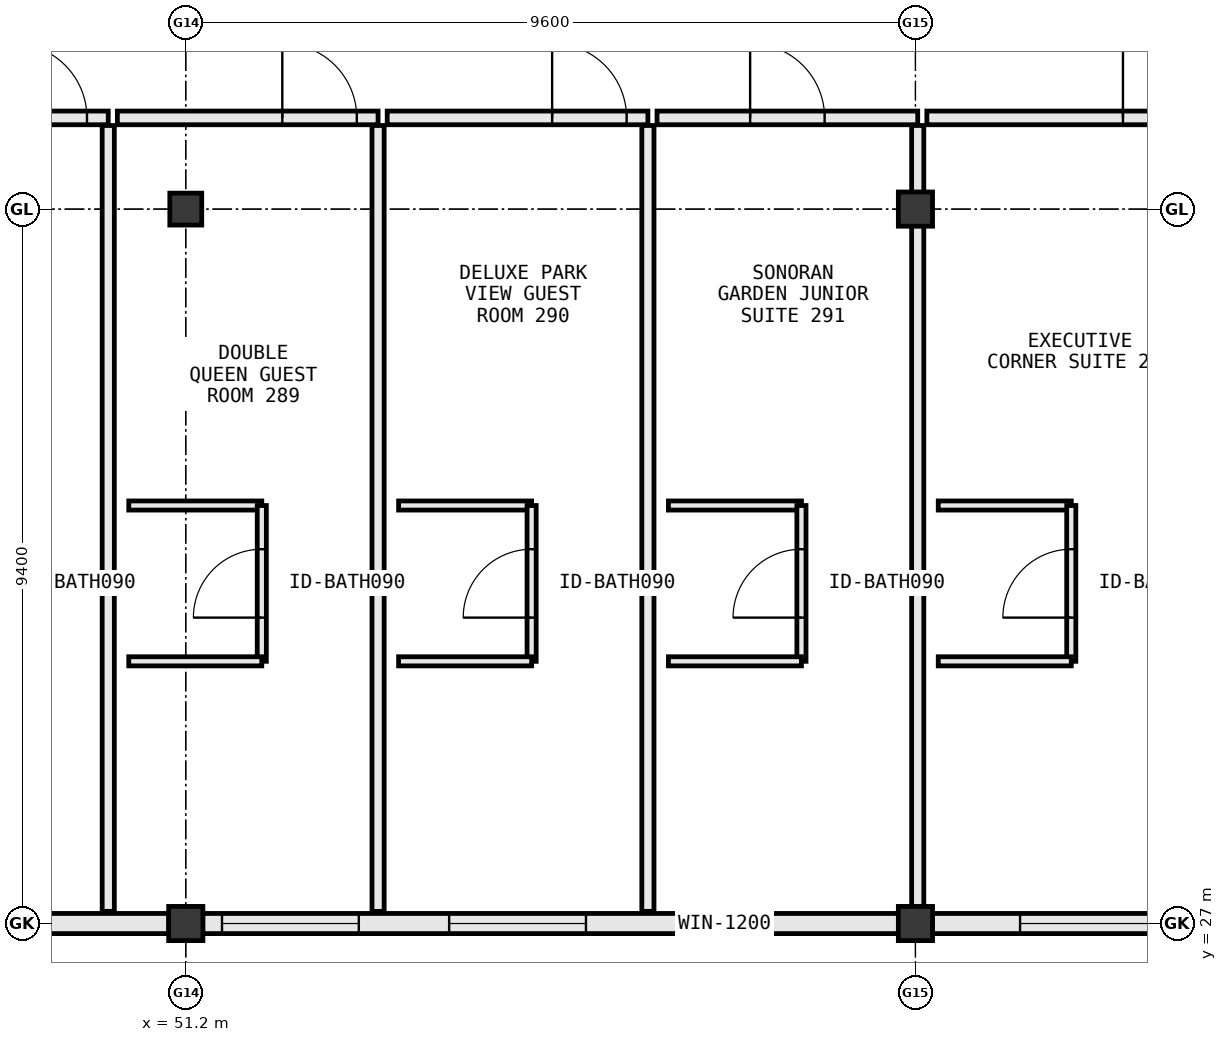
"""IFC4 building model, lengths in metres.
Left out: names, types, materials, properties, quantities, classifications, styles, units other than length and angle.
Written with IfcOpenShell. Run it as: python <this file> out.ifc"""

import sys

from ifc_helpers import new_model, si_unit, direction, frame, frame_2d, origin, origin_2d, place, context, subcontext, project, spatial, rectangle, extrude, element, fill, save


model = new_model("IFC4")
c1 = context("Model", 3, precision=1e-05, world=origin(), true_north=direction((0.0, 1.0)))
c2 = subcontext(c1, "Body", "Model", "MODEL_VIEW")
j1 = project(units=[si_unit("LENGTHUNIT", "METRE"), si_unit("PLANEANGLEUNIT", "RADIAN")], contexts=[c1])
p1 = place(None, origin())
s1 = spatial("IfcSite", under=j1, at=p1, CompositionType="ELEMENT")
p2 = place(p1, origin())
s2 = spatial("IfcBuilding", under=s1, at=p2, CompositionType="ELEMENT")
p3 = place(p2, frame((0.0, 0.0, 42.8)))
s3 = spatial("IfcBuildingStorey", under=s2, at=p3, CompositionType="ELEMENT", Elevation=42.8)
for number, where, z_axis, x_axis in (
    (1, (60.8, 27.0, 0.0), (0.0, 0.0, 1.0), (1.0, 0.0, 0.0)),
    (2, (60.8, 36.4, 0.0), (0.0, 0.0, 1.0), (1.0, 0.0, 0.0)),
    (3, (51.2, 27.0, 0.0), (0.0, 0.0, 1.0), (1.0, 0.0, 0.0)),
):
    element("IfcColumn", number, at=place(p3, frame(where, z_axis=z_axis, x_axis=x_axis)), inside=s3, PredefinedType="COLUMN", context=c2, shape_type="SweptSolid", body=[
        extrude(rectangle(XDim=0.45, YDim=0.45, at=origin_2d()), origin(), (0.0, 0.0, 1.0), 3.8),
    ])
p4 = place(p3, frame((51.2, 36.4, 0.0), z_axis=(0.0, 0.0, 1.0), x_axis=(1.0, 0.0, 0.0)))
e4 = element("IfcColumn", 4, at=p4, inside=s3, PredefinedType="COLUMN", context=c2, shape_type="SweptSolid", body=[
    extrude(rectangle(XDim=0.42, YDim=0.42, at=origin_2d()), origin(), (0.0, 0.0, 1.0), 3.8),
])
p5 = place(p3, frame((46.623, 27.0, 0.0), z_axis=(0.0, 0.0, 1.0), x_axis=(1.0, 0.0, 0.0)))
e5 = element("IfcWall", 5, at=p5, inside=s3, PredefinedType="STANDARD", context=c2, shape_type="SweptSolid", body=[
    extrude(rectangle(XDim=4.354, YDim=0.265, at=frame_2d((2.177, 0.0))), origin(), (0.0, 0.0, 1.0), 2.995),
])
p6 = place(p5, frame((0.942, 0.0, 0.85)))
e6 = element("IfcOpeningElement", 6, at=p6, cuts=e5, PredefinedType="OPENING", context=c2, shape_type="SweptSolid", body=[
    extrude(rectangle(XDim=1.8, YDim=1.85, at=frame_2d((0.9, 0.925))), frame((0.0, 0.145, 0.0), z_axis=(0.0, -1.0, 0.0), x_axis=(1.0, 0.0, 0.0)), (0.0, 0.0, 1.0), 0.289),
])
p7 = place(p3, frame((51.423, 27.0, 0.0), z_axis=(0.0, 0.0, 1.0), x_axis=(1.0, 0.0, 0.0)))
e7 = element("IfcWall", 7, at=p7, inside=s3, PredefinedType="STANDARD", context=c2, shape_type="SweptSolid", body=[
    extrude(rectangle(XDim=9.154, YDim=0.265, at=frame_2d((4.577, 0.0))), origin(), (0.0, 0.0, 1.0), 2.815),
])
p8 = place(p7, frame((6.265, 0.0, 0.85)))
e8 = element("IfcOpeningElement", 8, at=p8, cuts=e7, PredefinedType="OPENING", context=c2, shape_type="SweptSolid", body=[
    extrude(rectangle(XDim=1.2, YDim=1.55, at=frame_2d((0.6, 0.775))), frame((0.0, 0.145, 0.0), z_axis=(0.0, -1.0, 0.0), x_axis=(1.0, 0.0, 0.0)), (0.0, 0.0, 1.0), 0.289),
])
p9 = place(p7, frame((0.253, 0.0, 0.825)))
e9 = element("IfcOpeningElement", 9, at=p9, cuts=e7, PredefinedType="OPENING", context=c2, shape_type="SweptSolid", body=[
    extrude(rectangle(XDim=1.8, YDim=1.85, at=frame_2d((0.9, 0.925))), frame((0.0, 0.145, 0.0), z_axis=(0.0, -1.0, 0.0), x_axis=(1.0, 0.0, 0.0)), (0.0, 0.0, 1.0), 0.289),
])
p10 = place(p7, frame((3.242, 0.0, 0.825)))
e10 = element("IfcOpeningElement", 10, at=p10, cuts=e7, PredefinedType="OPENING", context=c2, shape_type="SweptSolid", body=[
    extrude(rectangle(XDim=1.8, YDim=1.85, at=frame_2d((0.9, 0.925))), frame((0.0, 0.145, 0.0), z_axis=(0.0, -1.0, 0.0), x_axis=(1.0, 0.0, 0.0)), (0.0, 0.0, 1.0), 0.289),
])
p11 = place(p3, frame((61.023, 27.0, 0.0), z_axis=(0.0, 0.0, 1.0), x_axis=(1.0, 0.0, 0.0)))
e11 = element("IfcWall", 11, at=p11, inside=s3, PredefinedType="STANDARD", context=c2, shape_type="SweptSolid", body=[
    extrude(rectangle(XDim=4.369, YDim=0.265, at=frame_2d((2.185, 0.0))), origin(), (0.0, 0.0, 1.0), 2.995),
])
p12 = place(p11, frame((1.154, 0.0, 0.85)))
e12 = element("IfcOpeningElement", 12, at=p12, cuts=e11, PredefinedType="OPENING", context=c2, shape_type="SweptSolid", body=[
    extrude(rectangle(XDim=1.8, YDim=1.85, at=frame_2d((0.9, 0.925))), frame((0.0, 0.145, 0.0), z_axis=(0.0, -1.0, 0.0), x_axis=(1.0, 0.0, 0.0)), (0.0, 0.0, 1.0), 0.289),
])
p13 = place(p3, frame((50.18, 37.6, 0.0), z_axis=(0.0, 0.0, 1.0), x_axis=(-1.0, 0.0, 0.0)))
e13 = element("IfcWall", 13, at=p13, inside=s3, PredefinedType="PARTITIONING", context=c2, shape_type="SweptSolid", body=[
    extrude(rectangle(XDim=3.43, YDim=0.18, at=frame_2d((1.715, 0.0))), origin(), (0.0, 0.0, 1.0), 3.54),
])
p14 = place(p13, frame((0.28, 0.0, 0.0)))
e14 = element("IfcOpeningElement", 14, at=p14, cuts=e13, PredefinedType="OPENING", context=c2, shape_type="SweptSolid", body=[
    extrude(rectangle(XDim=0.98, YDim=2.18, at=frame_2d((0.49, 1.09))), frame((0.0, 0.102, 0.0), z_axis=(0.0, -1.0, 0.0), x_axis=(1.0, 0.0, 0.0)), (0.0, 0.0, 1.0), 0.204),
])
p15 = place(p3, frame((50.18, 27.16, 0.0), z_axis=(0.0, 0.0, 1.0), x_axis=(0.0, 1.0, 0.0)))
e15 = element("IfcWall", 15, at=p15, inside=s3, PredefinedType="PARTITIONING", context=c2, shape_type="SweptSolid", body=[
    extrude(rectangle(XDim=10.34, YDim=0.16, at=frame_2d((5.17, 0.0))), origin(), (0.0, 0.0, 1.0), 3.54),
])
p16 = place(p3, frame((53.73, 37.6, 0.0), z_axis=(0.0, 0.0, 1.0), x_axis=(-1.0, 0.0, 0.0)))
e16 = element("IfcWall", 16, at=p16, inside=s3, PredefinedType="PARTITIONING", context=c2, shape_type="SweptSolid", body=[
    extrude(rectangle(XDim=3.43, YDim=0.18, at=frame_2d((1.715, 0.0))), origin(), (0.0, 0.0, 1.0), 3.54),
])
p17 = place(p16, frame((0.28, 0.0, 0.0)))
e17 = element("IfcOpeningElement", 17, at=p17, cuts=e16, PredefinedType="OPENING", context=c2, shape_type="SweptSolid", body=[
    extrude(rectangle(XDim=0.98, YDim=2.18, at=frame_2d((0.49, 1.09))), frame((0.0, 0.102, 0.0), z_axis=(0.0, -1.0, 0.0), x_axis=(1.0, 0.0, 0.0)), (0.0, 0.0, 1.0), 0.204),
])
p18 = place(p3, frame((53.73, 27.16, 0.0), z_axis=(0.0, 0.0, 1.0), x_axis=(0.0, 1.0, 0.0)))
e18 = element("IfcWall", 18, at=p18, inside=s3, PredefinedType="PARTITIONING", context=c2, shape_type="SweptSolid", body=[
    extrude(rectangle(XDim=10.34, YDim=0.16, at=frame_2d((5.17, 0.0))), origin(), (0.0, 0.0, 1.0), 3.54),
])
p19 = place(p3, frame((50.45, 32.5, 0.0), z_axis=(0.0, 0.0, 1.0), x_axis=(1.0, 0.0, 0.0)))
e19 = element("IfcWall", 19, at=p19, inside=s3, PredefinedType="PARTITIONING", context=c2, shape_type="SweptSolid", body=[
    extrude(rectangle(XDim=1.75, YDim=0.12, at=frame_2d((0.875, 0.0))), origin(), (0.0, 0.0, 1.0), 3.54),
])
p20 = place(p3, frame((52.2, 30.45, 0.0), z_axis=(0.0, 0.0, 1.0), x_axis=(0.0, 1.0, 0.0)))
e20 = element("IfcWall", 20, at=p20, inside=s3, PredefinedType="PARTITIONING", context=c2, shape_type="SweptSolid", body=[
    extrude(rectangle(XDim=2.05, YDim=0.12, at=frame_2d((1.025, 0.0))), origin(), (0.0, 0.0, 1.0), 3.54),
])
p21 = place(p20, frame((0.575, 0.0, 0.0)))
e21 = element("IfcOpeningElement", 21, at=p21, cuts=e20, PredefinedType="OPENING", context=c2, shape_type="SweptSolid", body=[
    extrude(rectangle(XDim=0.9, YDim=2.15, at=frame_2d((0.45, 1.075))), frame((0.0, 0.072, 0.0), z_axis=(0.0, -1.0, 0.0), x_axis=(1.0, 0.0, 0.0)), (0.0, 0.0, 1.0), 0.144),
])
p22 = place(p3, frame((50.45, 30.45, 0.0), z_axis=(0.0, 0.0, 1.0), x_axis=(1.0, 0.0, 0.0)))
e22 = element("IfcWall", 22, at=p22, inside=s3, PredefinedType="PARTITIONING", context=c2, shape_type="SweptSolid", body=[
    extrude(rectangle(XDim=1.75, YDim=0.12, at=frame_2d((0.875, 0.0))), origin(), (0.0, 0.0, 1.0), 3.54),
])
p23 = place(p3, frame((57.28, 37.6, 0.0), z_axis=(0.0, 0.0, 1.0), x_axis=(-1.0, 0.0, 0.0)))
e23 = element("IfcWall", 23, at=p23, inside=s3, PredefinedType="PARTITIONING", context=c2, shape_type="SweptSolid", body=[
    extrude(rectangle(XDim=3.43, YDim=0.18, at=frame_2d((1.715, 0.0))), origin(), (0.0, 0.0, 1.0), 3.54),
])
p24 = place(p23, frame((0.28, 0.0, 0.0)))
e24 = element("IfcOpeningElement", 24, at=p24, cuts=e23, PredefinedType="OPENING", context=c2, shape_type="SweptSolid", body=[
    extrude(rectangle(XDim=0.98, YDim=2.18, at=frame_2d((0.49, 1.09))), frame((0.0, 0.102, 0.0), z_axis=(0.0, -1.0, 0.0), x_axis=(1.0, 0.0, 0.0)), (0.0, 0.0, 1.0), 0.204),
])
p25 = place(p3, frame((57.28, 27.16, 0.0), z_axis=(0.0, 0.0, 1.0), x_axis=(0.0, 1.0, 0.0)))
e25 = element("IfcWall", 25, at=p25, inside=s3, PredefinedType="PARTITIONING", context=c2, shape_type="SweptSolid", body=[
    extrude(rectangle(XDim=10.34, YDim=0.16, at=frame_2d((5.17, 0.0))), origin(), (0.0, 0.0, 1.0), 3.085),
])
p26 = place(p3, frame((54.0, 32.5, 0.0), z_axis=(0.0, 0.0, 1.0), x_axis=(1.0, 0.0, 0.0)))
e26 = element("IfcWall", 26, at=p26, inside=s3, PredefinedType="PARTITIONING", context=c2, shape_type="SweptSolid", body=[
    extrude(rectangle(XDim=1.75, YDim=0.12, at=frame_2d((0.875, 0.0))), origin(), (0.0, 0.0, 1.0), 3.54),
])
p27 = place(p3, frame((55.75, 30.45, 0.0), z_axis=(0.0, 0.0, 1.0), x_axis=(0.0, 1.0, 0.0)))
e27 = element("IfcWall", 27, at=p27, inside=s3, PredefinedType="PARTITIONING", context=c2, shape_type="SweptSolid", body=[
    extrude(rectangle(XDim=2.05, YDim=0.12, at=frame_2d((1.025, 0.0))), origin(), (0.0, 0.0, 1.0), 3.54),
])
p28 = place(p27, frame((0.575, 0.0, 0.0)))
e28 = element("IfcOpeningElement", 28, at=p28, cuts=e27, PredefinedType="OPENING", context=c2, shape_type="SweptSolid", body=[
    extrude(rectangle(XDim=0.9, YDim=2.15, at=frame_2d((0.45, 1.075))), frame((0.0, 0.072, 0.0), z_axis=(0.0, -1.0, 0.0), x_axis=(1.0, 0.0, 0.0)), (0.0, 0.0, 1.0), 0.144),
])
p29 = place(p3, frame((54.0, 30.45, 0.0), z_axis=(0.0, 0.0, 1.0), x_axis=(1.0, 0.0, 0.0)))
e29 = element("IfcWall", 29, at=p29, inside=s3, PredefinedType="PARTITIONING", context=c2, shape_type="SweptSolid", body=[
    extrude(rectangle(XDim=1.75, YDim=0.12, at=frame_2d((0.875, 0.0))), origin(), (0.0, 0.0, 1.0), 3.54),
])
p30 = place(p3, frame((60.83, 37.6, 0.0), z_axis=(0.0, 0.0, 1.0), x_axis=(-1.0, 0.0, 0.0)))
e30 = element("IfcWall", 30, at=p30, inside=s3, PredefinedType="PARTITIONING", context=c2, shape_type="SweptSolid", body=[
    extrude(rectangle(XDim=3.43, YDim=0.18, at=frame_2d((1.715, 0.0))), origin(), (0.0, 0.0, 1.0), 3.54),
])
p31 = place(p30, frame((1.225, 0.0, 0.0)))
e31 = element("IfcOpeningElement", 31, at=p31, cuts=e30, PredefinedType="OPENING", context=c2, shape_type="SweptSolid", body=[
    extrude(rectangle(XDim=0.98, YDim=2.18, at=frame_2d((0.49, 1.09))), frame((0.0, 0.102, 0.0), z_axis=(0.0, -1.0, 0.0), x_axis=(1.0, 0.0, 0.0)), (0.0, 0.0, 1.0), 0.204),
])
p32 = place(p3, frame((60.83, 27.16, 0.0), z_axis=(0.0, 0.0, 1.0), x_axis=(0.0, 1.0, 0.0)))
e32 = element("IfcWall", 32, at=p32, inside=s3, PredefinedType="PARTITIONING", context=c2, shape_type="SweptSolid", body=[
    extrude(rectangle(XDim=10.34, YDim=0.16, at=frame_2d((5.17, 0.0))), origin(), (0.0, 0.0, 1.0), 2.895),
])
p33 = place(p3, frame((57.55, 32.5, 0.0), z_axis=(0.0, 0.0, 1.0), x_axis=(1.0, 0.0, 0.0)))
e33 = element("IfcWall", 33, at=p33, inside=s3, PredefinedType="PARTITIONING", context=c2, shape_type="SweptSolid", body=[
    extrude(rectangle(XDim=1.75, YDim=0.12, at=frame_2d((0.875, 0.0))), origin(), (0.0, 0.0, 1.0), 3.54),
])
p34 = place(p3, frame((59.3, 30.45, 0.0), z_axis=(0.0, 0.0, 1.0), x_axis=(0.0, 1.0, 0.0)))
e34 = element("IfcWall", 34, at=p34, inside=s3, PredefinedType="PARTITIONING", context=c2, shape_type="SweptSolid", body=[
    extrude(rectangle(XDim=2.05, YDim=0.12, at=frame_2d((1.025, 0.0))), origin(), (0.0, 0.0, 1.0), 3.54),
])
p35 = place(p34, frame((0.575, 0.0, 0.0)))
e35 = element("IfcOpeningElement", 35, at=p35, cuts=e34, PredefinedType="OPENING", context=c2, shape_type="SweptSolid", body=[
    extrude(rectangle(XDim=0.9, YDim=2.15, at=frame_2d((0.45, 1.075))), frame((0.0, 0.072, 0.0), z_axis=(0.0, -1.0, 0.0), x_axis=(1.0, 0.0, 0.0)), (0.0, 0.0, 1.0), 0.144),
])
p36 = place(p3, frame((57.55, 30.45, 0.0), z_axis=(0.0, 0.0, 1.0), x_axis=(1.0, 0.0, 0.0)))
e36 = element("IfcWall", 36, at=p36, inside=s3, PredefinedType="PARTITIONING", context=c2, shape_type="SweptSolid", body=[
    extrude(rectangle(XDim=1.75, YDim=0.12, at=frame_2d((0.875, 0.0))), origin(), (0.0, 0.0, 1.0), 3.54),
])
p37 = place(p3, frame((65.13, 37.6, 0.0), z_axis=(0.0, 0.0, 1.0), x_axis=(-1.0, 0.0, 0.0)))
e37 = element("IfcWall", 37, at=p37, inside=s3, PredefinedType="PARTITIONING", context=c2, shape_type="SweptSolid", body=[
    extrude(rectangle(XDim=4.18, YDim=0.18, at=frame_2d((2.09, 0.0))), origin(), (0.0, 0.0, 1.0), 3.54),
])
p38 = place(p37, frame((0.62, 0.0, 0.0)))
e38 = element("IfcOpeningElement", 38, at=p38, cuts=e37, PredefinedType="OPENING", context=c2, shape_type="SweptSolid", body=[
    extrude(rectangle(XDim=0.98, YDim=2.18, at=frame_2d((0.49, 1.09))), frame((0.0, 0.102, 0.0), z_axis=(0.0, -1.0, 0.0), x_axis=(1.0, 0.0, 0.0)), (0.0, 0.0, 1.0), 0.204),
])
p39 = place(p3, frame((61.1, 32.5, 0.0), z_axis=(0.0, 0.0, 1.0), x_axis=(1.0, 0.0, 0.0)))
e39 = element("IfcWall", 39, at=p39, inside=s3, PredefinedType="PARTITIONING", context=c2, shape_type="SweptSolid", body=[
    extrude(rectangle(XDim=1.75, YDim=0.12, at=frame_2d((0.875, 0.0))), origin(), (0.0, 0.0, 1.0), 3.54),
])
p40 = place(p3, frame((62.85, 30.45, 0.0), z_axis=(0.0, 0.0, 1.0), x_axis=(0.0, 1.0, 0.0)))
e40 = element("IfcWall", 40, at=p40, inside=s3, PredefinedType="PARTITIONING", context=c2, shape_type="SweptSolid", body=[
    extrude(rectangle(XDim=2.05, YDim=0.12, at=frame_2d((1.025, 0.0))), origin(), (0.0, 0.0, 1.0), 3.085),
])
p41 = place(p40, frame((0.575, 0.0, 0.0)))
e41 = element("IfcOpeningElement", 41, at=p41, cuts=e40, PredefinedType="OPENING", context=c2, shape_type="SweptSolid", body=[
    extrude(rectangle(XDim=0.9, YDim=2.15, at=frame_2d((0.45, 1.075))), frame((0.0, 0.072, 0.0), z_axis=(0.0, -1.0, 0.0), x_axis=(1.0, 0.0, 0.0)), (0.0, 0.0, 1.0), 0.144),
])
p42 = place(p3, frame((61.1, 30.45, 0.0), z_axis=(0.0, 0.0, 1.0), x_axis=(1.0, 0.0, 0.0)))
e42 = element("IfcWall", 42, at=p42, inside=s3, PredefinedType="PARTITIONING", context=c2, shape_type="SweptSolid", body=[
    extrude(rectangle(XDim=1.75, YDim=0.12, at=frame_2d((0.875, 0.0))), origin(), (0.0, 0.0, 1.0), 3.54),
])
p43 = place(p8, origin())
e43 = element("IfcWindow", 43, at=p43, inside=s3, PartitioningType="SINGLE_PANEL", PredefinedType="WINDOW", context=c2, shape_type="SweptSolid", body=[
    extrude(rectangle(XDim=1.2, YDim=1.55, at=frame_2d((0.6, 0.775))), frame((0.0, 0.03, 0.0), z_axis=(0.0, -1.0, 0.0), x_axis=(1.0, 0.0, 0.0)), (0.0, 0.0, 1.0), 0.06),
])
fill(e8, e43)
p44 = place(p9, origin())
e44 = element("IfcWindow", 44, at=p44, inside=s3, PartitioningType="SINGLE_PANEL", PredefinedType="WINDOW", context=c2, shape_type="SweptSolid", body=[
    extrude(rectangle(XDim=1.8, YDim=1.85, at=frame_2d((0.9, 0.925))), frame((0.0, 0.03, 0.0), z_axis=(0.0, -1.0, 0.0), x_axis=(1.0, 0.0, 0.0)), (0.0, 0.0, 1.0), 0.06),
])
fill(e9, e44)
p45 = place(p10, origin())
e45 = element("IfcWindow", 45, at=p45, inside=s3, PartitioningType="SINGLE_PANEL", PredefinedType="WINDOW", context=c2, shape_type="SweptSolid", body=[
    extrude(rectangle(XDim=1.8, YDim=1.85, at=frame_2d((0.9, 0.925))), frame((0.0, 0.03, 0.0), z_axis=(0.0, -1.0, 0.0), x_axis=(1.0, 0.0, 0.0)), (0.0, 0.0, 1.0), 0.06),
])
fill(e10, e45)
p46 = place(p12, origin())
e46 = element("IfcWindow", 46, at=p46, inside=s3, PartitioningType="SINGLE_PANEL", PredefinedType="WINDOW", context=c2, shape_type="SweptSolid", body=[
    extrude(rectangle(XDim=1.8, YDim=1.85, at=frame_2d((0.9, 0.925))), frame((0.0, 0.03, 0.0), z_axis=(0.0, -1.0, 0.0), x_axis=(1.0, 0.0, 0.0)), (0.0, 0.0, 1.0), 0.06),
])
fill(e12, e46)
p47 = place(p14, frame((0.98, 0.0, 0.0), z_axis=(0.0, 0.0, 1.0), x_axis=(-1.0, 0.0, 0.0)))
e47 = element("IfcDoor", 47, at=p47, inside=s3, OperationType="SINGLE_SWING_RIGHT", PredefinedType="DOOR", context=c2, shape_type="SweptSolid", body=[
    extrude(rectangle(XDim=0.98, YDim=2.18, at=frame_2d((0.49, 1.09))), frame((0.0, 0.025, 0.0), z_axis=(0.0, -1.0, 0.0), x_axis=(1.0, 0.0, 0.0)), (0.0, 0.0, 1.0), 0.05),
])
fill(e14, e47)
p48 = place(p17, frame((0.98, 0.0, 0.0), z_axis=(0.0, 0.0, 1.0), x_axis=(-1.0, 0.0, 0.0)))
e48 = element("IfcDoor", 48, at=p48, inside=s3, OperationType="SINGLE_SWING_RIGHT", PredefinedType="DOOR", context=c2, shape_type="SweptSolid", body=[
    extrude(rectangle(XDim=0.98, YDim=2.18, at=frame_2d((0.49, 1.09))), frame((0.0, 0.025, 0.0), z_axis=(0.0, -1.0, 0.0), x_axis=(1.0, 0.0, 0.0)), (0.0, 0.0, 1.0), 0.05),
])
fill(e17, e48)
p49 = place(p21, origin())
e49 = element("IfcDoor", 49, at=p49, inside=s3, OperationType="SINGLE_SWING_LEFT", PredefinedType="DOOR", context=c2, shape_type="SweptSolid", body=[
    extrude(rectangle(XDim=0.9, YDim=2.15, at=frame_2d((0.45, 1.075))), frame((0.0, 0.025, 0.0), z_axis=(0.0, -1.0, 0.0), x_axis=(1.0, 0.0, 0.0)), (0.0, 0.0, 1.0), 0.05),
])
fill(e21, e49)
p50 = place(p24, frame((0.98, 0.0, 0.0), z_axis=(0.0, 0.0, 1.0), x_axis=(-1.0, 0.0, 0.0)))
e50 = element("IfcDoor", 50, at=p50, inside=s3, OperationType="SINGLE_SWING_RIGHT", PredefinedType="DOOR", context=c2, shape_type="SweptSolid", body=[
    extrude(rectangle(XDim=0.98, YDim=2.18, at=frame_2d((0.49, 1.09))), frame((0.0, 0.025, 0.0), z_axis=(0.0, -1.0, 0.0), x_axis=(1.0, 0.0, 0.0)), (0.0, 0.0, 1.0), 0.05),
])
fill(e24, e50)
p51 = place(p28, origin())
e51 = element("IfcDoor", 51, at=p51, inside=s3, OperationType="SINGLE_SWING_LEFT", PredefinedType="DOOR", context=c2, shape_type="SweptSolid", body=[
    extrude(rectangle(XDim=0.9, YDim=2.15, at=frame_2d((0.45, 1.075))), frame((0.0, 0.025, 0.0), z_axis=(0.0, -1.0, 0.0), x_axis=(1.0, 0.0, 0.0)), (0.0, 0.0, 1.0), 0.05),
])
fill(e28, e51)
p52 = place(p31, frame((0.98, 0.0, 0.0), z_axis=(0.0, 0.0, 1.0), x_axis=(-1.0, 0.0, 0.0)))
e52 = element("IfcDoor", 52, at=p52, inside=s3, OperationType="SINGLE_SWING_RIGHT", PredefinedType="DOOR", context=c2, shape_type="SweptSolid", body=[
    extrude(rectangle(XDim=0.98, YDim=2.18, at=frame_2d((0.49, 1.09))), frame((0.0, 0.025, 0.0), z_axis=(0.0, -1.0, 0.0), x_axis=(1.0, 0.0, 0.0)), (0.0, 0.0, 1.0), 0.05),
])
fill(e31, e52)
p53 = place(p35, origin())
e53 = element("IfcDoor", 53, at=p53, inside=s3, OperationType="SINGLE_SWING_LEFT", PredefinedType="DOOR", context=c2, shape_type="SweptSolid", body=[
    extrude(rectangle(XDim=0.9, YDim=2.15, at=frame_2d((0.45, 1.075))), frame((0.0, 0.025, 0.0), z_axis=(0.0, -1.0, 0.0), x_axis=(1.0, 0.0, 0.0)), (0.0, 0.0, 1.0), 0.05),
])
fill(e35, e53)
p54 = place(p38, frame((0.98, 0.0, 0.0), z_axis=(0.0, 0.0, 1.0), x_axis=(-1.0, 0.0, 0.0)))
e54 = element("IfcDoor", 54, at=p54, inside=s3, OperationType="SINGLE_SWING_RIGHT", PredefinedType="DOOR", context=c2, shape_type="SweptSolid", body=[
    extrude(rectangle(XDim=0.98, YDim=2.18, at=frame_2d((0.49, 1.09))), frame((0.0, 0.025, 0.0), z_axis=(0.0, -1.0, 0.0), x_axis=(1.0, 0.0, 0.0)), (0.0, 0.0, 1.0), 0.05),
])
fill(e38, e54)
p55 = place(p41, origin())
e55 = element("IfcDoor", 55, at=p55, inside=s3, OperationType="SINGLE_SWING_LEFT", PredefinedType="DOOR", context=c2, shape_type="SweptSolid", body=[
    extrude(rectangle(XDim=0.9, YDim=2.15, at=frame_2d((0.45, 1.075))), frame((0.0, 0.025, 0.0), z_axis=(0.0, -1.0, 0.0), x_axis=(1.0, 0.0, 0.0)), (0.0, 0.0, 1.0), 0.05),
])
fill(e41, e55)
save(model, sys.argv[1])
